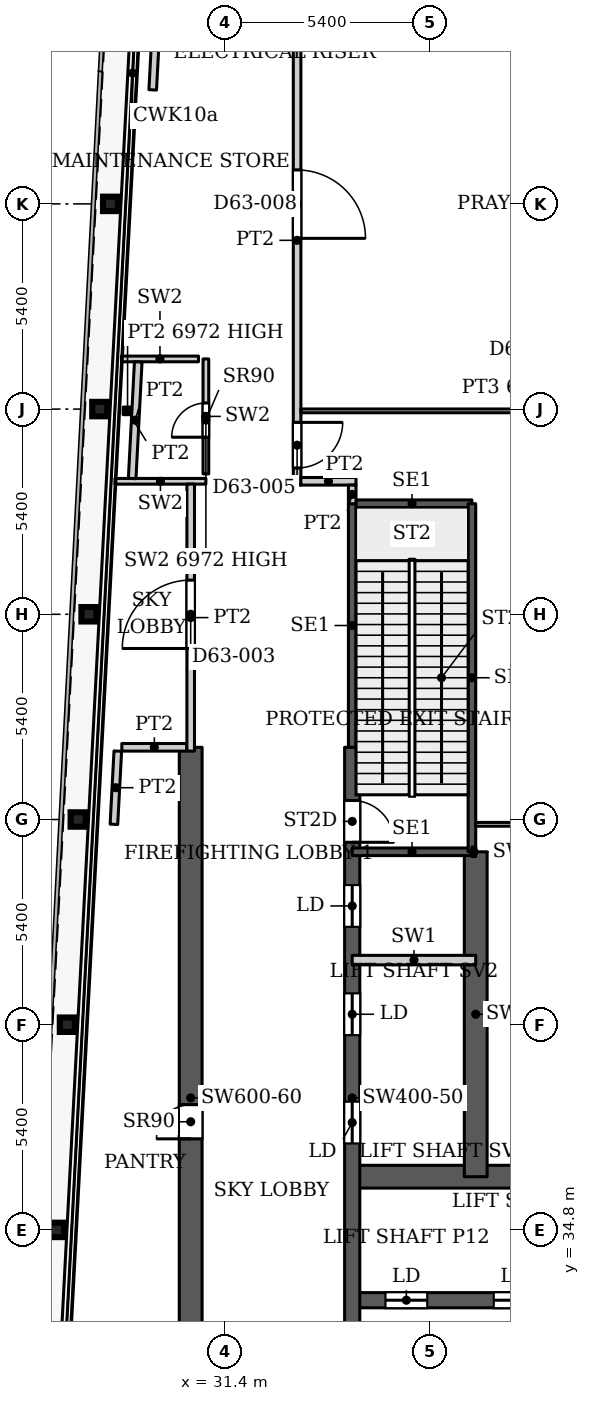
"""IFC4 building model, lengths in metres.
Left out: names, types, materials, properties, quantities, classifications, styles, units other than length and angle.
Written with IfcOpenShell. Run it as: python <this file> out.ifc"""

import sys

from ifc_helpers import new_model, si_unit, direction, frame, frame_2d, origin, origin_2d, place, context, subcontext, project, spatial, rectangle, i_section, extrude, source, transform, mapped, element, fill, save


model = new_model("IFC4")
c1 = context("Model", 3, precision=1e-05, world=origin(), true_north=direction((0.0, 1.0)))
c2 = subcontext(c1, "Body", "Model", "MODEL_VIEW")
j1 = project(units=[si_unit("LENGTHUNIT", "METRE"), si_unit("PLANEANGLEUNIT", "RADIAN")], contexts=[c1])
p1 = place(None, origin())
s1 = spatial("IfcSite", under=j1, at=p1, CompositionType="ELEMENT")
p2 = place(p1, origin())
s2 = spatial("IfcBuilding", under=s1, at=p2, CompositionType="ELEMENT")
p3 = place(p2, frame((0.0, 0.0, 266.9)))
s3 = spatial("IfcBuildingStorey", under=s2, at=p3, CompositionType="ELEMENT", Elevation=266.9)
for number, where, z_axis, x_axis in (
    (1, (26.969, 34.8, 0.0), (0.0, 0.0, 1.0), (1.0, 0.0, 0.0)),
    (2, (27.253, 40.2, 0.0), (0.0, 0.0, 1.0), (1.0, 0.0, 0.0)),
    (3, (27.537, 45.6, 0.0), (0.0, 0.0, 1.0), (1.0, 0.0, 0.0)),
    (4, (27.822, 51.0, 0.0), (0.0, 0.0, 1.0), (1.0, 0.0, 0.0)),
    (5, (28.106, 56.4, 0.0), (0.0, 0.0, 1.0), (1.0, 0.0, 0.0)),
    (6, (28.39, 61.8, 0.0), (0.0, 0.0, 1.0), (1.0, 0.0, 0.0)),
):
    element("IfcColumn", number, at=place(p3, frame(where, z_axis=z_axis, x_axis=x_axis)), inside=s3, PredefinedType="COLUMN", context=c2, shape_type="SweptSolid", body=[
        extrude(i_section(OverallWidth=0.395, OverallDepth=0.38, WebThickness=0.019, FlangeThickness=0.03, FilletRadius=0.011, at=origin_2d()), origin(), (0.0, 0.0, 1.0), 7.8),
    ])
p4 = place(p3, frame((34.75, 32.95, 0.0), z_axis=(0.0, 0.0, 1.0), x_axis=(1.0, 0.0, 0.0)))
e7 = element("IfcWall", 7, at=p4, inside=s3, PredefinedType="SHEAR", context=c2, shape_type="SweptSolid", body=[
    extrude(rectangle(XDim=14.25, YDim=0.4, at=frame_2d((7.125, 0.0))), origin(), (0.0, 0.0, 1.0), 7.8),
])
p5 = place(p4, frame((0.875, 0.0, 0.0)))
e8 = element("IfcOpeningElement", 8, at=p5, cuts=e7, PredefinedType="OPENING", context=c2, shape_type="SweptSolid", body=[
    extrude(rectangle(XDim=1.1, YDim=2.2, at=frame_2d((0.55, 1.1))), frame((0.0, 0.21, 0.0), z_axis=(0.0, -1.0, 0.0), x_axis=(1.0, 0.0, 0.0)), (0.0, 0.0, 1.0), 0.42),
])
p6 = place(p4, frame((3.725, 0.0, 0.0)))
e9 = element("IfcOpeningElement", 9, at=p6, cuts=e7, PredefinedType="OPENING", context=c2, shape_type="SweptSolid", body=[
    extrude(rectangle(XDim=1.1, YDim=2.2, at=frame_2d((0.55, 1.1))), frame((0.0, 0.21, 0.0), z_axis=(0.0, -1.0, 0.0), x_axis=(1.0, 0.0, 0.0)), (0.0, 0.0, 1.0), 0.42),
])
p7 = place(p4, frame((6.575, 0.0, 0.0)))
e10 = element("IfcOpeningElement", 10, at=p7, cuts=e7, PredefinedType="OPENING", context=c2, shape_type="SweptSolid", body=[
    extrude(rectangle(XDim=1.1, YDim=2.2, at=frame_2d((0.55, 1.1))), frame((0.0, 0.21, 0.0), z_axis=(0.0, -1.0, 0.0), x_axis=(1.0, 0.0, 0.0)), (0.0, 0.0, 1.0), 0.42),
])
p8 = place(p4, frame((9.425, 0.0, 0.0)))
e11 = element("IfcOpeningElement", 11, at=p8, cuts=e7, PredefinedType="OPENING", context=c2, shape_type="SweptSolid", body=[
    extrude(rectangle(XDim=1.1, YDim=2.2, at=frame_2d((0.55, 1.1))), frame((0.0, 0.21, 0.0), z_axis=(0.0, -1.0, 0.0), x_axis=(1.0, 0.0, 0.0)), (0.0, 0.0, 1.0), 0.42),
])
p9 = place(p4, frame((12.275, 0.0, 0.0)))
e12 = element("IfcOpeningElement", 12, at=p9, cuts=e7, PredefinedType="OPENING", context=c2, shape_type="SweptSolid", body=[
    extrude(rectangle(XDim=1.1, YDim=2.2, at=frame_2d((0.55, 1.1))), frame((0.0, 0.21, 0.0), z_axis=(0.0, -1.0, 0.0), x_axis=(1.0, 0.0, 0.0)), (0.0, 0.0, 1.0), 0.42),
])
p10 = place(p3, frame((34.75, 36.2, 0.0), z_axis=(0.0, 0.0, 1.0), x_axis=(1.0, 0.0, 0.0)))
e13 = element("IfcWall", 13, at=p10, inside=s3, PredefinedType="SHEAR", context=c2, shape_type="SweptSolid", body=[
    extrude(rectangle(XDim=18.4, YDim=0.6, at=frame_2d((9.2, 0.0))), origin(), (0.0, 0.0, 1.0), 7.8),
])
p11 = place(p10, frame((16.9, 0.0, 0.0)))
e14 = element("IfcOpeningElement", 14, at=p11, cuts=e13, PredefinedType="OPENING", context=c2, shape_type="SweptSolid", body=[
    extrude(rectangle(XDim=1.0, YDim=2.2, at=frame_2d((0.5, 1.1))), frame((0.0, 0.31, 0.0), z_axis=(0.0, -1.0, 0.0), x_axis=(1.0, 0.0, 0.0)), (0.0, 0.0, 1.0), 0.62),
])
p12 = place(p3, frame((34.75, 29.05, 0.0), z_axis=(0.0, 0.0, 1.0), x_axis=(0.0, 1.0, 0.0)))
e15 = element("IfcWall", 15, at=p12, inside=s3, PredefinedType="SHEAR", context=c2, shape_type="SweptSolid", body=[
    extrude(rectangle(XDim=18.45, YDim=0.4, at=frame_2d((9.225, 0.0))), origin(), (0.0, 0.0, 1.0), 7.8),
])
p13 = place(p12, frame((8.025, 0.0, 0.0)))
e16 = element("IfcOpeningElement", 16, at=p13, cuts=e15, PredefinedType="OPENING", context=c2, shape_type="SweptSolid", body=[
    extrude(rectangle(XDim=1.1, YDim=2.2, at=frame_2d((0.55, 1.1))), frame((0.0, 0.21, 0.0), z_axis=(0.0, -1.0, 0.0), x_axis=(1.0, 0.0, 0.0)), (0.0, 0.0, 1.0), 0.42),
])
p14 = place(p12, frame((10.875, 0.0, 0.0)))
e17 = element("IfcOpeningElement", 17, at=p14, cuts=e15, PredefinedType="OPENING", context=c2, shape_type="SweptSolid", body=[
    extrude(rectangle(XDim=1.1, YDim=2.2, at=frame_2d((0.55, 1.1))), frame((0.0, 0.21, 0.0), z_axis=(0.0, -1.0, 0.0), x_axis=(1.0, 0.0, 0.0)), (0.0, 0.0, 1.0), 0.42),
])
p15 = place(p12, frame((13.725, 0.0, 0.0)))
e18 = element("IfcOpeningElement", 18, at=p15, cuts=e15, PredefinedType="OPENING", context=c2, shape_type="SweptSolid", body=[
    extrude(rectangle(XDim=1.1, YDim=2.2, at=frame_2d((0.55, 1.1))), frame((0.0, 0.21, 0.0), z_axis=(0.0, -1.0, 0.0), x_axis=(1.0, 0.0, 0.0)), (0.0, 0.0, 1.0), 0.42),
])
p16 = place(p12, frame((15.95, 0.0, 0.0)))
e19 = element("IfcOpeningElement", 19, at=p16, cuts=e15, PredefinedType="OPENING", context=c2, shape_type="SweptSolid", body=[
    extrude(rectangle(XDim=1.1, YDim=2.2, at=frame_2d((0.55, 1.1))), frame((0.0, 0.21, 0.0), z_axis=(0.0, -1.0, 0.0), x_axis=(1.0, 0.0, 0.0)), (0.0, 0.0, 1.0), 0.42),
])
p17 = place(p3, frame((38.0, 36.2, 0.0), z_axis=(0.0, 0.0, 1.0), x_axis=(0.0, 1.0, 0.0)))
e20 = element("IfcWall", 20, at=p17, inside=s3, PredefinedType="SHEAR", context=c2, shape_type="SweptSolid", body=[
    extrude(rectangle(XDim=8.55, YDim=0.6, at=frame_2d((4.275, 0.0))), origin(), (0.0, 0.0, 1.0), 7.8),
])
p18 = place(p3, frame((30.5, 29.05, 0.0), z_axis=(0.0, 0.0, 1.0), x_axis=(0.0, 1.0, 0.0)))
e21 = element("IfcWall", 21, at=p18, inside=s3, PredefinedType="SHEAR", context=c2, shape_type="SweptSolid", body=[
    extrude(rectangle(XDim=18.45, YDim=0.6, at=frame_2d((9.225, 0.0))), origin(), (0.0, 0.0, 1.0), 7.8),
])
p19 = place(p18, frame((1.5, 0.0, 0.0)))
e22 = element("IfcOpeningElement", 22, at=p19, cuts=e21, PredefinedType="OPENING", context=c2, shape_type="SweptSolid", body=[
    extrude(rectangle(XDim=0.9, YDim=2.2, at=frame_2d((0.45, 1.1))), frame((0.0, 0.31, 0.0), z_axis=(0.0, -1.0, 0.0), x_axis=(1.0, 0.0, 0.0)), (0.0, 0.0, 1.0), 0.62),
])
p20 = place(p18, frame((8.146, 0.0, 0.0)))
e23 = element("IfcOpeningElement", 23, at=p20, cuts=e21, PredefinedType="OPENING", context=c2, shape_type="SweptSolid", body=[
    extrude(rectangle(XDim=0.9, YDim=2.2, at=frame_2d((0.45, 1.1))), frame((0.0, 0.31, 0.0), z_axis=(0.0, -1.0, 0.0), x_axis=(1.0, 0.0, 0.0)), (0.0, 0.0, 1.0), 0.62),
])
for number, where, z_axis, x_axis in (
    (24, (34.75, 44.75, 0.0), (0.0, 0.0, 1.0), (1.0, 0.0, 0.0)),
    (25, (34.75, 53.91, 0.0), (0.0, 0.0, 1.0), (1.0, 0.0, 0.0)),
):
    element("IfcWall", number, at=place(p3, frame(where, z_axis=z_axis, x_axis=x_axis)), inside=s3, PredefinedType="SHEAR", context=c2, shape_type="SweptSolid", body=[
        extrude(rectangle(XDim=3.15, YDim=0.2, at=frame_2d((1.575, 0.0))), origin(), (0.0, 0.0, 1.0), 7.8),
    ])
p21 = place(p3, frame((34.75, 47.5, 0.0), z_axis=(0.0, 0.0, 1.0), x_axis=(0.0, 1.0, 0.0)))
e26 = element("IfcWall", 26, at=p21, inside=s3, PredefinedType="SHEAR", context=c2, shape_type="SweptSolid", body=[
    extrude(rectangle(XDim=6.41, YDim=0.2, at=frame_2d((3.205, 0.0))), origin(), (0.0, 0.0, 1.0), 7.8),
])
p22 = place(p3, frame((37.9, 44.75, 0.0), z_axis=(0.0, 0.0, 1.0), x_axis=(0.0, 1.0, 0.0)))
e27 = element("IfcWall", 27, at=p22, inside=s3, PredefinedType="SHEAR", context=c2, shape_type="SweptSolid", body=[
    extrude(rectangle(XDim=9.16, YDim=0.2, at=frame_2d((4.58, 0.0))), origin(), (0.0, 0.0, 1.0), 7.8),
])
p23 = place(p3, frame((34.75, 41.9, 0.0), z_axis=(0.0, 0.0, 1.0), x_axis=(1.0, 0.0, 0.0)))
e28 = element("IfcWall", 28, at=p23, inside=s3, PredefinedType="PARTITIONING", context=c2, shape_type="SweptSolid", body=[
    extrude(rectangle(XDim=3.25, YDim=0.25, at=frame_2d((1.625, 0.0))), origin(), (0.0, 0.0, 1.0), 7.8),
])
p24 = place(p3, frame((37.9, 44.75, 0.0), z_axis=(0.0, 0.0, 1.0), x_axis=(1.0, 0.0, 0.0)))
e29 = element("IfcWall", 29, at=p24, inside=s3, PredefinedType="PARTITIONING", context=c2, shape_type="SweptSolid", body=[
    extrude(rectangle(XDim=0.1, YDim=0.25, at=frame_2d((0.05, 0.0))), origin(), (0.0, 0.0, 1.0), 7.8),
])
p25 = place(p3, frame((28.508, 54.5, 0.0), z_axis=(0.0, 0.0, 1.0), x_axis=(1.0, 0.0, 0.0)))
e30 = element("IfcWall", 30, at=p25, inside=s3, PredefinedType="PARTITIONING", context=c2, shape_type="SweptSolid", body=[
    extrude(rectangle(XDim=2.392, YDim=0.15, at=frame_2d((1.196, 0.0))), origin(), (0.0, 0.0, 1.0), 7.8),
])
p26 = place(p3, frame((30.9, 54.695, 0.0), z_axis=(0.0, 0.0, 1.0), x_axis=(0.0, 1.0, 0.0)))
e31 = element("IfcWall", 31, at=p26, inside=s3, PredefinedType="PARTITIONING", context=c2, shape_type="SweptSolid", body=[
    extrude(rectangle(XDim=3.025, YDim=0.15, at=frame_2d((1.512, 0.0))), origin(), (0.0, 0.0, 1.0), 6.972),
])
p27 = place(p26, frame((0.965, 0.0, 0.0)))
e32 = element("IfcOpeningElement", 32, at=p27, cuts=e31, PredefinedType="OPENING", context=c2, shape_type="SweptSolid", body=[
    extrude(rectangle(XDim=0.9, YDim=2.2, at=frame_2d((0.45, 1.1))), frame((0.0, 0.085, 0.0), z_axis=(0.0, -1.0, 0.0), x_axis=(1.0, 0.0, 0.0)), (0.0, 0.0, 1.0), 0.17),
])
p28 = place(p3, frame((28.678, 57.72, 0.0), z_axis=(0.0, 0.0, 1.0), x_axis=(1.0, 0.0, 0.0)))
e33 = element("IfcWall", 33, at=p28, inside=s3, PredefinedType="PARTITIONING", context=c2, shape_type="SweptSolid", body=[
    extrude(rectangle(XDim=2.027, YDim=0.15, at=frame_2d((1.014, 0.0))), origin(), (0.0, 0.0, 1.0), 7.8),
])
p29 = place(p3, frame((28.48, 45.473, 0.0), z_axis=(0.0, 0.0, 1.0), x_axis=(0.052884210331, 0.99860065106, 0.0)))
e34 = element("IfcWall", 34, at=p29, inside=s3, PredefinedType="PARTITIONING", context=c2, shape_type="SweptSolid", body=[
    extrude(rectangle(XDim=1.93, YDim=0.2, at=frame_2d((0.965, 0.0))), origin(), (0.0, 0.0, 1.0), 7.5),
])
p30 = place(p3, frame((28.688, 47.5, 0.0), z_axis=(0.0, 0.0, 1.0), x_axis=(1.0, 0.0, 0.0)))
e35 = element("IfcWall", 35, at=p30, inside=s3, PredefinedType="PARTITIONING", context=c2, shape_type="SweptSolid", body=[
    extrude(rectangle(XDim=1.712, YDim=0.2, at=frame_2d((0.856, 0.0))), origin(), (0.0, 0.0, 1.0), 7.5),
])
p31 = place(p3, frame((28.724, 56.353, 0.0), z_axis=(0.0, 0.0, 1.0), x_axis=(1.0, 0.0, 0.0)))
e36 = element("IfcWall", 36, at=p31, inside=s3, PredefinedType="PARTITIONING", context=c2, shape_type="SweptSolid", body=[
    extrude(rectangle(XDim=0.23, YDim=0.2, at=frame_2d((0.115, 0.0))), origin(), (0.0, 0.0, 1.0), 6.972),
])
p32 = place(p3, frame((28.96, 54.574, 0.0), z_axis=(0.0, 0.0, 1.0), x_axis=(0.052145785312, 0.998639483034, 0.0)))
e37 = element("IfcWall", 37, at=p32, inside=s3, PredefinedType="PARTITIONING", context=c2, shape_type="SweptSolid", body=[
    extrude(rectangle(XDim=3.071, YDim=0.2, at=frame_2d((1.536, 0.0))), origin(), (0.0, 0.0, 1.0), 7.5),
])
p33 = place(p3, frame((29.501, 64.8, 0.0), z_axis=(0.0, 0.0, 1.0), x_axis=(0.052619165502, 0.998614652117, 0.0)))
e38 = element("IfcWall", 38, at=p33, inside=s3, PredefinedType="PARTITIONING", context=c2, shape_type="SweptSolid", body=[
    extrude(rectangle(XDim=26.549, YDim=0.2, at=frame_2d((13.274, 0.0))), origin(), (0.0, 0.0, 1.0), 7.5),
])
p34 = place(p3, frame((30.5, 47.4, 0.0), z_axis=(0.0, 0.0, 1.0), x_axis=(0.0, 1.0, 0.0)))
e39 = element("IfcWall", 39, at=p34, inside=s3, PredefinedType="PARTITIONING", context=c2, shape_type="SweptSolid", body=[
    extrude(rectangle(XDim=7.026, YDim=0.2, at=frame_2d((3.513, 0.0))), origin(), (0.0, 0.0, 1.0), 7.5),
])
p35 = place(p34, frame((2.7, 0.0, 0.0)))
e40 = element("IfcOpeningElement", 40, at=p35, cuts=e39, PredefinedType="OPENING", context=c2, shape_type="SweptSolid", body=[
    extrude(rectangle(XDim=1.8, YDim=2.1, at=frame_2d((0.9, 1.05))), frame((0.0, 0.11, 0.0), z_axis=(0.0, -1.0, 0.0), x_axis=(1.0, 0.0, 0.0)), (0.0, 0.0, 1.0), 0.22),
])
p36 = place(p3, frame((33.3, 54.4, 0.0), z_axis=(0.0, 0.0, 1.0), x_axis=(0.0, 1.0, 0.0)))
e41 = element("IfcWall", 41, at=p36, inside=s3, PredefinedType="PARTITIONING", context=c2, shape_type="SweptSolid", body=[
    extrude(rectangle(XDim=12.882, YDim=0.2, at=frame_2d((6.441, 0.0))), origin(), (0.0, 0.0, 1.0), 7.5),
])
p37 = place(p36, frame((0.45, 0.0, 0.0)))
e42 = element("IfcOpeningElement", 42, at=p37, cuts=e41, PredefinedType="OPENING", context=c2, shape_type="SweptSolid", body=[
    extrude(rectangle(XDim=1.2, YDim=2.1, at=frame_2d((0.6, 1.05))), frame((0.0, 0.11, 0.0), z_axis=(0.0, -1.0, 0.0), x_axis=(1.0, 0.0, 0.0)), (0.0, 0.0, 1.0), 0.22),
])
p38 = place(p36, frame((6.493, 0.0, 0.0)))
e43 = element("IfcOpeningElement", 43, at=p38, cuts=e41, PredefinedType="OPENING", context=c2, shape_type="SweptSolid", body=[
    extrude(rectangle(XDim=1.8, YDim=2.1, at=frame_2d((0.9, 1.05))), frame((0.0, 0.11, 0.0), z_axis=(0.0, -1.0, 0.0), x_axis=(1.0, 0.0, 0.0)), (0.0, 0.0, 1.0), 0.22),
])
p39 = place(p3, frame((33.4, 54.5, 0.0), z_axis=(0.0, 0.0, 1.0), x_axis=(1.0, 0.0, 0.0)))
e44 = element("IfcWall", 44, at=p39, inside=s3, PredefinedType="PARTITIONING", context=c2, shape_type="SweptSolid", body=[
    extrude(rectangle(XDim=1.45, YDim=0.2, at=frame_2d((0.725, 0.0))), origin(), (0.0, 0.0, 1.0), 7.5),
])
p40 = place(p3, frame((33.4, 56.353, 0.0), z_axis=(0.0, 0.0, 1.0), x_axis=(1.0, 0.0, 0.0)))
e45 = element("IfcWall", 45, at=p40, inside=s3, PredefinedType="PARTITIONING", context=c2, shape_type="SweptSolid", body=[
    extrude(rectangle(XDim=12.57, YDim=0.1, at=frame_2d((6.285, 0.0))), origin(), (0.0, 0.0, 1.0), 6.972),
])
p41 = place(p40, frame((5.55, 0.0, 0.0)))
e46 = element("IfcOpeningElement", 46, at=p41, cuts=e45, PredefinedType="OPENING", context=c2, shape_type="SweptSolid", body=[
    extrude(rectangle(XDim=1.0, YDim=2.1, at=frame_2d((0.5, 1.05))), frame((0.0, 0.06, 0.0), z_axis=(0.0, -1.0, 0.0), x_axis=(1.0, 0.0, 0.0)), (0.0, 0.0, 1.0), 0.12),
])
p42 = place(p3, frame((34.75, 53.91, 0.0), z_axis=(0.0, 0.0, 1.0), x_axis=(0.0, 1.0, 0.0)))
e47 = element("IfcWall", 47, at=p42, inside=s3, PredefinedType="PARTITIONING", context=c2, shape_type="SweptSolid", body=[
    extrude(rectangle(XDim=0.49, YDim=0.2, at=frame_2d((0.245, 0.0))), origin(), (0.0, 0.0, 1.0), 7.5),
])
p43 = place(p3, frame((37.999, 45.473, 0.0), z_axis=(0.0, 0.0, 1.0), x_axis=(1.0, 0.0, 0.0)))
e48 = element("IfcWall", 48, at=p43, inside=s3, PredefinedType="PARTITIONING", context=c2, shape_type="SweptSolid", body=[
    extrude(rectangle(XDim=9.941, YDim=0.1, at=frame_2d((4.97, 0.0))), origin(), (0.0, 0.0, 1.0), 7.5),
])
p44 = place(p43, frame((4.551, 0.0, 0.0)))
e49 = element("IfcOpeningElement", 49, at=p44, cuts=e48, PredefinedType="OPENING", context=c2, shape_type="SweptSolid", body=[
    extrude(rectangle(XDim=1.0, YDim=2.1, at=frame_2d((0.5, 1.05))), frame((0.0, 0.06, 0.0), z_axis=(0.0, -1.0, 0.0), x_axis=(1.0, 0.0, 0.0)), (0.0, 0.0, 1.0), 0.12),
])
m1 = source(origin(), c2, "Body", "SweptSolid", [
    extrude(rectangle(XDim=1.1, YDim=2.2, at=frame_2d((0.55, 1.1))), frame((0.0, 0.025, 0.0), z_axis=(0.0, -1.0, 0.0), x_axis=(1.0, 0.0, 0.0)), (0.0, 0.0, 1.0), 0.05),
])
p45 = place(p5, origin())
e50 = element("IfcDoor", 50, at=p45, inside=s3, OperationType="SLIDING_TO_LEFT", PredefinedType="DOOR", context=c2, shape_type="MappedRepresentation", body=[
    mapped(m1, transform((0.0, 0.0, 0.0), x_axis=(1.0, 0.0, 0.0), y_axis=(0.0, 1.0, 0.0), z_axis=(0.0, 0.0, 1.0), scale=1.0)),
])
fill(e8, e50)
p46 = place(p6, origin())
e51 = element("IfcDoor", 51, at=p46, inside=s3, OperationType="SLIDING_TO_LEFT", PredefinedType="DOOR", context=c2, shape_type="MappedRepresentation", body=[
    mapped(m1, transform((0.0, 0.0, 0.0), x_axis=(1.0, 0.0, 0.0), y_axis=(0.0, 1.0, 0.0), z_axis=(0.0, 0.0, 1.0), scale=1.0)),
])
fill(e9, e51)
p47 = place(p13, origin())
e52 = element("IfcDoor", 52, at=p47, inside=s3, OperationType="SLIDING_TO_LEFT", PredefinedType="DOOR", context=c2, shape_type="MappedRepresentation", body=[
    mapped(m1, transform((0.0, 0.0, 0.0), x_axis=(1.0, 0.0, 0.0), y_axis=(0.0, 1.0, 0.0), z_axis=(0.0, 0.0, 1.0), scale=1.0)),
])
fill(e16, e52)
p48 = place(p14, origin())
e53 = element("IfcDoor", 53, at=p48, inside=s3, OperationType="SLIDING_TO_LEFT", PredefinedType="DOOR", context=c2, shape_type="MappedRepresentation", body=[
    mapped(m1, transform((0.0, 0.0, 0.0), x_axis=(1.0, 0.0, 0.0), y_axis=(0.0, 1.0, 0.0), z_axis=(0.0, 0.0, 1.0), scale=1.0)),
])
fill(e17, e53)
p49 = place(p15, origin())
e54 = element("IfcDoor", 54, at=p49, inside=s3, OperationType="SLIDING_TO_LEFT", PredefinedType="DOOR", context=c2, shape_type="MappedRepresentation", body=[
    mapped(m1, transform((0.0, 0.0, 0.0), x_axis=(1.0, 0.0, 0.0), y_axis=(0.0, 1.0, 0.0), z_axis=(0.0, 0.0, 1.0), scale=1.0)),
])
fill(e18, e54)
m2 = source(origin(), c2, "Body", "SweptSolid", [
    extrude(rectangle(XDim=0.9, YDim=2.2, at=frame_2d((0.45, 1.1))), frame((0.0, 0.025, 0.0), z_axis=(0.0, -1.0, 0.0), x_axis=(1.0, 0.0, 0.0)), (0.0, 0.0, 1.0), 0.05),
])
p50 = place(p20, origin())
e55 = element("IfcDoor", 55, at=p50, inside=s3, OperationType="SINGLE_SWING_LEFT", PredefinedType="DOOR", context=c2, shape_type="MappedRepresentation", body=[
    mapped(m2, transform((0.0, 0.0, 0.0), x_axis=(1.0, 0.0, 0.0), y_axis=(0.0, 1.0, 0.0), z_axis=(0.0, 0.0, 1.0), scale=1.0)),
])
fill(e23, e55)
p51 = place(p27, origin())
e56 = element("IfcDoor", 56, at=p51, inside=s3, OperationType="SINGLE_SWING_LEFT", PredefinedType="DOOR", context=c2, shape_type="MappedRepresentation", body=[
    mapped(m2, transform((0.0, 0.0, 0.0), x_axis=(1.0, 0.0, 0.0), y_axis=(0.0, 1.0, 0.0), z_axis=(0.0, 0.0, 1.0), scale=1.0)),
])
fill(e32, e56)
m3 = source(origin(), c2, "Body", "SweptSolid", [
    extrude(rectangle(XDim=1.1, YDim=2.2, at=frame_2d((0.55, 1.1))), frame((0.0, 0.025, 0.0), z_axis=(0.0, -1.0, 0.0), x_axis=(1.0, 0.0, 0.0)), (0.0, 0.0, 1.0), 0.05),
])
p52 = place(p16, origin())
e57 = element("IfcDoor", 57, at=p52, inside=s3, OperationType="SINGLE_SWING_RIGHT", PredefinedType="DOOR", context=c2, shape_type="MappedRepresentation", body=[
    mapped(m3, transform((0.0, 0.0, 0.0), x_axis=(1.0, 0.0, 0.0), y_axis=(0.0, 1.0, 0.0), z_axis=(0.0, 0.0, 1.0), scale=1.0)),
])
fill(e19, e57)
m4 = source(origin(), c2, "Body", "SweptSolid", [
    extrude(rectangle(XDim=1.8, YDim=2.1, at=frame_2d((0.9, 1.05))), frame((0.0, 0.025, 0.0), z_axis=(0.0, -1.0, 0.0), x_axis=(1.0, 0.0, 0.0)), (0.0, 0.0, 1.0), 0.05),
])
p53 = place(p35, origin())
e58 = element("IfcDoor", 58, at=p53, inside=s3, OperationType="DOUBLE_DOOR_SINGLE_SWING", PredefinedType="DOOR", context=c2, shape_type="MappedRepresentation", body=[
    mapped(m4, transform((0.0, 0.0, 0.0), x_axis=(1.0, 0.0, 0.0), y_axis=(0.0, 1.0, 0.0), z_axis=(0.0, 0.0, 1.0), scale=1.0)),
])
fill(e40, e58)
m5 = source(origin(), c2, "Body", "SweptSolid", [
    extrude(rectangle(XDim=1.2, YDim=2.1, at=frame_2d((0.6, 1.05))), frame((0.0, 0.025, 0.0), z_axis=(0.0, -1.0, 0.0), x_axis=(1.0, 0.0, 0.0)), (0.0, 0.0, 1.0), 0.05),
])
p54 = place(p37, origin())
e59 = element("IfcDoor", 59, at=p54, inside=s3, OperationType="SINGLE_SWING_RIGHT", PredefinedType="DOOR", context=c2, shape_type="MappedRepresentation", body=[
    mapped(m5, transform((0.0, 0.0, 0.0), x_axis=(1.0, 0.0, 0.0), y_axis=(0.0, 1.0, 0.0), z_axis=(0.0, 0.0, 1.0), scale=1.0)),
])
fill(e42, e59)
p55 = place(p38, origin())
e60 = element("IfcDoor", 60, at=p55, inside=s3, OperationType="DOUBLE_DOOR_SINGLE_SWING", PredefinedType="DOOR", context=c2, shape_type="MappedRepresentation", body=[
    mapped(m4, transform((0.0, 0.0, 0.0), x_axis=(1.0, 0.0, 0.0), y_axis=(0.0, 1.0, 0.0), z_axis=(0.0, 0.0, 1.0), scale=1.0)),
])
fill(e43, e60)
save(model, sys.argv[1])
